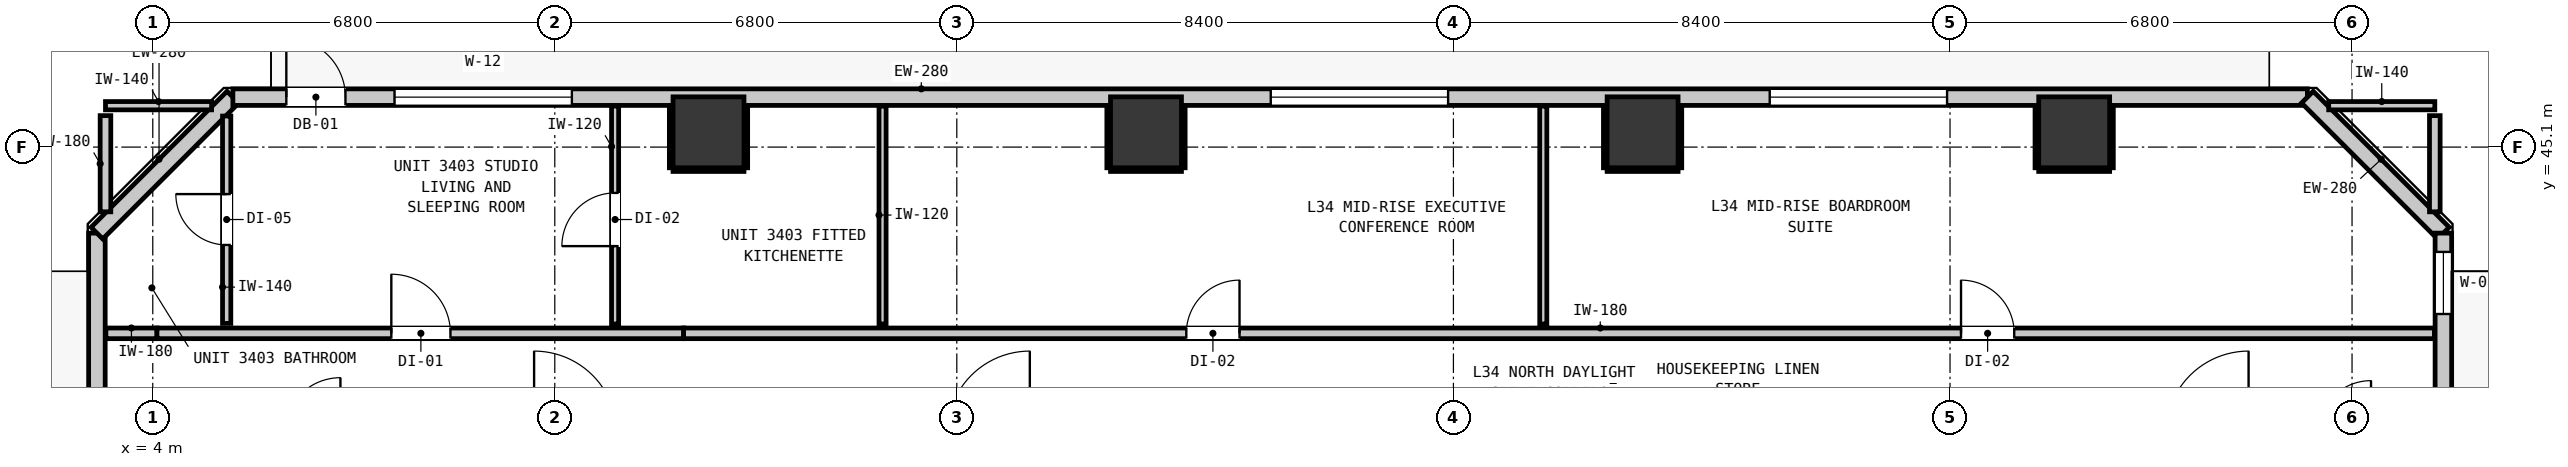
"""IFC4 building model, lengths in metres.
Left out: names, types, materials, properties, quantities, classifications, styles, units other than length and angle.
Written with IfcOpenShell. Run it as: python <this file> out.ifc"""

import sys

from ifc_helpers import new_model, si_unit, direction, frame, frame_2d, origin, origin_2d, place, context, subcontext, project, spatial, rectangle, extrude, element, fill, save


model = new_model("IFC4")
c1 = context("Model", 3, precision=1e-05, world=origin(), true_north=direction((0.0, 1.0)))
c2 = subcontext(c1, "Body", "Model", "MODEL_VIEW")
j1 = project(units=[si_unit("LENGTHUNIT", "METRE"), si_unit("PLANEANGLEUNIT", "RADIAN")], contexts=[c1])
p1 = place(None, origin())
s1 = spatial("IfcSite", under=j1, at=p1, CompositionType="ELEMENT")
p2 = place(p1, origin())
s2 = spatial("IfcBuilding", under=s1, at=p2, CompositionType="ELEMENT")
p3 = place(p2, frame((0.0, 0.0, 119.36)))
s3 = spatial("IfcBuildingStorey", under=s2, at=p3, CompositionType="ELEMENT", Elevation=119.36)
for number, where, z_axis, x_axis in (
    (1, (13.4, 45.35, 0.0), (0.0, 0.0, 1.0), (1.0, 0.0, 0.0)),
    (2, (20.8, 45.35, 0.0), (0.0, 0.0, 1.0), (1.0, 0.0, 0.0)),
    (3, (29.2, 45.35, 0.0), (0.0, 0.0, 1.0), (1.0, 0.0, 0.0)),
    (4, (36.5, 45.35, 0.0), (0.0, 0.0, 1.0), (1.0, 0.0, 0.0)),
):
    element("IfcColumn", number, at=place(p3, frame(where, z_axis=z_axis, x_axis=x_axis)), inside=s3, PredefinedType="COLUMN", context=c2, shape_type="SweptSolid", body=[
        extrude(rectangle(XDim=1.2, YDim=1.2, at=origin_2d()), origin(), (0.0, 0.0, 1.0), 3.32),
    ])
p4 = place(p3, frame((3.055, 11.355, 0.0), z_axis=(0.0, 0.0, 1.0), x_axis=(0.0, 1.0, 0.0)))
e5 = element("IfcWall", 5, at=p4, inside=s3, PredefinedType="STANDARD", context=c2, shape_type="SweptSolid", body=[
    extrude(rectangle(XDim=32.29, YDim=0.28, at=frame_2d((16.145, 0.0))), origin(), (0.0, 0.0, 1.0), 3.08),
])
p5 = place(p4, frame((5.818, 0.0, 0.0)))
e6 = element("IfcOpeningElement", 6, at=p5, cuts=e5, PredefinedType="OPENING", context=c2, shape_type="SweptSolid", body=[
    extrude(rectangle(XDim=1.0, YDim=2.15, at=frame_2d((0.5, 1.075))), frame((0.0, 0.15, 0.0), z_axis=(0.0, -1.0, 0.0), x_axis=(1.0, 0.0, 0.0)), (0.0, 0.0, 1.0), 0.3),
])
p6 = place(p4, frame((0.545, 0.0, 0.85)))
e7 = element("IfcOpeningElement", 7, at=p6, cuts=e5, PredefinedType="OPENING", context=c2, shape_type="SweptSolid", body=[
    extrude(rectangle(XDim=1.05, YDim=1.65, at=frame_2d((0.525, 0.825))), frame((0.0, 0.15, 0.0), z_axis=(0.0, -1.0, 0.0), x_axis=(1.0, 0.0, 0.0)), (0.0, 0.0, 1.0), 0.3),
])
p7 = place(p4, frame((13.495, 0.0, 0.85)))
e8 = element("IfcOpeningElement", 8, at=p7, cuts=e5, PredefinedType="OPENING", context=c2, shape_type="SweptSolid", body=[
    extrude(rectangle(XDim=3.0, YDim=2.1, at=frame_2d((1.5, 1.05))), frame((0.0, 0.15, 0.0), z_axis=(0.0, -1.0, 0.0), x_axis=(1.0, 0.0, 0.0)), (0.0, 0.0, 1.0), 0.3),
])
p8 = place(p3, frame((3.055, 43.645, 0.0), z_axis=(0.0, 0.0, 1.0), x_axis=(0.707106781187, 0.707106781187, 0.0)))
e9 = element("IfcWall", 9, at=p8, inside=s3, PredefinedType="STANDARD", context=c2, shape_type="SweptSolid", body=[
    extrude(rectangle(XDim=3.253, YDim=0.28, at=frame_2d((1.626, 0.0))), origin(), (0.0, 0.0, 1.0), 3.08),
])
p9 = place(p3, frame((5.355, 45.945, 0.0), z_axis=(0.0, 0.0, 1.0), x_axis=(1.0, 0.0, 0.0)))
e10 = element("IfcWall", 10, at=p9, inside=s3, PredefinedType="STANDARD", context=c2, shape_type="SweptSolid", body=[
    extrude(rectangle(XDim=35.09, YDim=0.28, at=frame_2d((17.545, 0.0))), origin(), (0.0, 0.0, 1.0), 3.08),
])
p10 = place(p9, frame((0.904, 0.0, 0.0)))
e11 = element("IfcOpeningElement", 11, at=p10, cuts=e10, PredefinedType="OPENING", context=c2, shape_type="SweptSolid", body=[
    extrude(rectangle(XDim=1.0, YDim=2.15, at=frame_2d((0.5, 1.075))), frame((0.0, 0.15, 0.0), z_axis=(0.0, -1.0, 0.0), x_axis=(1.0, 0.0, 0.0)), (0.0, 0.0, 1.0), 0.3),
])
p11 = place(p9, frame((2.734, 0.0, 0.85)))
e12 = element("IfcOpeningElement", 12, at=p11, cuts=e10, PredefinedType="OPENING", context=c2, shape_type="SweptSolid", body=[
    extrude(rectangle(XDim=3.0, YDim=2.1, at=frame_2d((1.5, 1.05))), frame((0.0, 0.15, 0.0), z_axis=(0.0, -1.0, 0.0), x_axis=(1.0, 0.0, 0.0)), (0.0, 0.0, 1.0), 0.3),
])
p12 = place(p9, frame((17.555, 0.0, 0.85)))
e13 = element("IfcOpeningElement", 13, at=p12, cuts=e10, PredefinedType="OPENING", context=c2, shape_type="SweptSolid", body=[
    extrude(rectangle(XDim=3.0, YDim=2.1, at=frame_2d((1.5, 1.05))), frame((0.0, 0.15, 0.0), z_axis=(0.0, -1.0, 0.0), x_axis=(1.0, 0.0, 0.0)), (0.0, 0.0, 1.0), 0.3),
])
p13 = place(p9, frame((25.995, 0.0, 0.85)))
e14 = element("IfcOpeningElement", 14, at=p13, cuts=e10, PredefinedType="OPENING", context=c2, shape_type="SweptSolid", body=[
    extrude(rectangle(XDim=3.0, YDim=2.1, at=frame_2d((1.5, 1.05))), frame((0.0, 0.15, 0.0), z_axis=(0.0, -1.0, 0.0), x_axis=(1.0, 0.0, 0.0)), (0.0, 0.0, 1.0), 0.3),
])
p14 = place(p3, frame((40.445, 45.945, 0.0), z_axis=(0.0, 0.0, 1.0), x_axis=(0.707106781187, -0.707106781187, 0.0)))
e15 = element("IfcWall", 15, at=p14, inside=s3, PredefinedType="STANDARD", context=c2, shape_type="SweptSolid", body=[
    extrude(rectangle(XDim=3.253, YDim=0.28, at=frame_2d((1.626, 0.0))), origin(), (0.0, 0.0, 1.0), 3.08),
])
p15 = place(p3, frame((42.745, 43.645, 0.0), z_axis=(0.0, 0.0, 1.0), x_axis=(0.0, -1.0, 0.0)))
e16 = element("IfcWall", 16, at=p15, inside=s3, PredefinedType="STANDARD", context=c2, shape_type="SweptSolid", body=[
    extrude(rectangle(XDim=32.29, YDim=0.28, at=frame_2d((16.145, 0.0))), origin(), (0.0, 0.0, 1.0), 3.08),
])
p16 = place(p15, frame((5.467, 0.0, 0.0)))
e17 = element("IfcOpeningElement", 17, at=p16, cuts=e16, PredefinedType="OPENING", context=c2, shape_type="SweptSolid", body=[
    extrude(rectangle(XDim=1.0, YDim=2.15, at=frame_2d((0.5, 1.075))), frame((0.0, 0.15, 0.0), z_axis=(0.0, -1.0, 0.0), x_axis=(1.0, 0.0, 0.0)), (0.0, 0.0, 1.0), 0.3),
])
p17 = place(p15, frame((28.098, 0.0, 0.85)))
e18 = element("IfcOpeningElement", 18, at=p17, cuts=e16, PredefinedType="OPENING", context=c2, shape_type="SweptSolid", body=[
    extrude(rectangle(XDim=3.0, YDim=2.1, at=frame_2d((1.5, 1.05))), frame((0.0, 0.15, 0.0), z_axis=(0.0, -1.0, 0.0), x_axis=(1.0, 0.0, 0.0)), (0.0, 0.0, 1.0), 0.3),
])
p18 = place(p15, frame((0.318, 0.0, 0.85)))
e19 = element("IfcOpeningElement", 19, at=p18, cuts=e16, PredefinedType="OPENING", context=c2, shape_type="SweptSolid", body=[
    extrude(rectangle(XDim=1.05, YDim=1.65, at=frame_2d((0.525, 0.825))), frame((0.0, 0.15, 0.0), z_axis=(0.0, -1.0, 0.0), x_axis=(1.0, 0.0, 0.0)), (0.0, 0.0, 1.0), 0.3),
])
p19 = place(p15, frame((14.883, 0.0, 0.85)))
e20 = element("IfcOpeningElement", 20, at=p19, cuts=e16, PredefinedType="OPENING", context=c2, shape_type="SweptSolid", body=[
    extrude(rectangle(XDim=3.0, YDim=2.1, at=frame_2d((1.5, 1.05))), frame((0.0, 0.15, 0.0), z_axis=(0.0, -1.0, 0.0), x_axis=(1.0, 0.0, 0.0)), (0.0, 0.0, 1.0), 0.3),
])
p20 = place(p3, frame((3.207, 41.95, 0.0), z_axis=(0.0, 0.0, 1.0), x_axis=(1.0, 0.0, 0.0)))
e21 = element("IfcWall", 21, at=p20, inside=s3, PredefinedType="PARTITIONING", context=c2, shape_type="SweptSolid", body=[
    extrude(rectangle(XDim=0.864, YDim=0.18, at=frame_2d((0.432, 0.0))), origin(), (0.0, 0.0, 1.0), 3.08),
])
p21 = place(p3, frame((4.071, 41.95, 0.0), z_axis=(0.0, 0.0, 1.0), x_axis=(1.0, 0.0, 0.0)))
e22 = element("IfcWall", 22, at=p21, inside=s3, PredefinedType="PARTITIONING", context=c2, shape_type="SweptSolid", body=[
    extrude(rectangle(XDim=8.908, YDim=0.18, at=frame_2d((4.454, 0.0))), origin(), (0.0, 0.0, 1.0), 2.565),
])
p22 = place(p21, frame((3.964, 0.0, 0.0)))
e23 = element("IfcOpeningElement", 23, at=p22, cuts=e22, PredefinedType="OPENING", context=c2, shape_type="SweptSolid", body=[
    extrude(rectangle(XDim=1.0, YDim=2.15, at=frame_2d((0.5, 1.075))), frame((0.0, 0.1, 0.0), z_axis=(0.0, -1.0, 0.0), x_axis=(1.0, 0.0, 0.0)), (0.0, 0.0, 1.0), 0.2),
])
p23 = place(p3, frame((12.979, 41.95, 0.0), z_axis=(0.0, 0.0, 1.0), x_axis=(1.0, 0.0, 0.0)))
e24 = element("IfcWall", 24, at=p23, inside=s3, PredefinedType="PARTITIONING", context=c2, shape_type="SweptSolid", body=[
    extrude(rectangle(XDim=29.614, YDim=0.18, at=frame_2d((14.807, 0.0))), origin(), (0.0, 0.0, 1.0), 3.08),
])
p24 = place(p23, frame((8.503, 0.0, 0.0)))
e25 = element("IfcOpeningElement", 25, at=p24, cuts=e24, PredefinedType="OPENING", context=c2, shape_type="SweptSolid", body=[
    extrude(rectangle(XDim=0.9, YDim=2.1, at=frame_2d((0.45, 1.05))), frame((0.0, 0.1, 0.0), z_axis=(0.0, -1.0, 0.0), x_axis=(1.0, 0.0, 0.0)), (0.0, 0.0, 1.0), 0.2),
])
p25 = place(p23, frame((21.607, 0.0, 0.0)))
e26 = element("IfcOpeningElement", 26, at=p25, cuts=e24, PredefinedType="OPENING", context=c2, shape_type="SweptSolid", body=[
    extrude(rectangle(XDim=0.9, YDim=2.1, at=frame_2d((0.45, 1.05))), frame((0.0, 0.1, 0.0), z_axis=(0.0, -1.0, 0.0), x_axis=(1.0, 0.0, 0.0)), (0.0, 0.0, 1.0), 0.2),
])
for number, where, z_axis, x_axis in (
    (27, (3.2, 45.8, 0.0), (0.0, 0.0, 1.0), (1.0, 0.0, 0.0)),
    (28, (40.805, 45.8, 0.0), (0.0, 0.0, 1.0), (1.0, 0.0, 0.0)),
):
    element("IfcWall", number, at=place(p3, frame(where, z_axis=z_axis, x_axis=x_axis)), inside=s3, PredefinedType="PARTITIONING", context=c2, shape_type="SweptSolid", body=[
        extrude(rectangle(XDim=1.795, YDim=0.14, at=frame_2d((0.897, 0.0))), origin(), (0.0, 0.0, 1.0), 3.08),
    ])
for number, where, z_axis, x_axis in (
    (29, (3.2, 44.005, 0.0), (0.0, 0.0, 1.0), (0.0, 1.0, 0.0)),
    (30, (42.6, 44.005, 0.0), (0.0, 0.0, 1.0), (0.0, 1.0, 0.0)),
):
    element("IfcWall", number, at=place(p3, frame(where, z_axis=z_axis, x_axis=x_axis)), inside=s3, PredefinedType="PARTITIONING", context=c2, shape_type="SweptSolid", body=[
        extrude(rectangle(XDim=1.627, YDim=0.18, at=frame_2d((0.813, 0.0))), origin(), (0.0, 0.0, 1.0), 3.08),
    ])
p26 = place(p3, frame((5.25, 42.118, 0.0), z_axis=(0.0, 0.0, 1.0), x_axis=(0.0, 1.0, 0.0)))
e31 = element("IfcWall", 31, at=p26, inside=s3, PredefinedType="PARTITIONING", context=c2, shape_type="SweptSolid", body=[
    extrude(rectangle(XDim=3.507, YDim=0.14, at=frame_2d((1.753, 0.0))), origin(), (0.0, 0.0, 1.0), 3.08),
])
p27 = place(p26, frame((1.327, 0.0, 0.0)))
e32 = element("IfcOpeningElement", 32, at=p27, cuts=e31, PredefinedType="OPENING", context=c2, shape_type="SweptSolid", body=[
    extrude(rectangle(XDim=0.86, YDim=2.02, at=frame_2d((0.43, 1.01))), frame((0.0, 0.08, 0.0), z_axis=(0.0, -1.0, 0.0), x_axis=(1.0, 0.0, 0.0)), (0.0, 0.0, 1.0), 0.16),
])
p28 = place(p3, frame((11.82, 42.108, 0.0), z_axis=(0.0, 0.0, 1.0), x_axis=(0.0, 1.0, 0.0)))
e33 = element("IfcWall", 33, at=p28, inside=s3, PredefinedType="PARTITIONING", context=c2, shape_type="SweptSolid", body=[
    extrude(rectangle(XDim=3.685, YDim=0.12, at=frame_2d((1.843, 0.0))), origin(), (0.0, 0.0, 1.0), 3.08),
])
p29 = place(p28, frame((1.317, 0.0, 0.0)))
e34 = element("IfcOpeningElement", 34, at=p29, cuts=e33, PredefinedType="OPENING", context=c2, shape_type="SweptSolid", body=[
    extrude(rectangle(XDim=0.9, YDim=2.1, at=frame_2d((0.45, 1.05))), frame((0.0, 0.07, 0.0), z_axis=(0.0, -1.0, 0.0), x_axis=(1.0, 0.0, 0.0)), (0.0, 0.0, 1.0), 0.14),
])
for number, where, z_axis, x_axis in (
    (35, (16.344, 42.108, 0.0), (0.0, 0.0, 1.0), (0.0, 1.0, 0.0)),
    (36, (27.52, 42.108, 0.0), (0.0, 0.0, 1.0), (0.0, 1.0, 0.0)),
):
    element("IfcWall", number, at=place(p3, frame(where, z_axis=z_axis, x_axis=x_axis)), inside=s3, PredefinedType="PARTITIONING", context=c2, shape_type="SweptSolid", body=[
        extrude(rectangle(XDim=3.685, YDim=0.12, at=frame_2d((1.843, 0.0))), origin(), (0.0, 0.0, 1.0), 3.08),
    ])
p30 = place(p3, frame((12.8, 44.718, 0.0), z_axis=(0.0, 0.0, 1.0), x_axis=(1.0, 0.0, 0.0)))
e37 = element("IfcWall", 37, at=p30, inside=s3, PredefinedType="PARTITIONING", context=c2, shape_type="SweptSolid", body=[
    extrude(rectangle(XDim=1.2, YDim=0.06, at=frame_2d((0.6, 0.0))), origin(), (0.0, 0.0, 1.0), 1.45),
])
for number, where, z_axis, x_axis in (
    (38, (12.768, 44.75, 0.0), (0.0, 0.0, 1.0), (0.0, 1.0, 0.0)),
    (39, (14.032, 44.75, 0.0), (0.0, 0.0, 1.0), (0.0, 1.0, 0.0)),
):
    element("IfcWall", number, at=place(p3, frame(where, z_axis=z_axis, x_axis=x_axis)), inside=s3, PredefinedType="PARTITIONING", context=c2, shape_type="SweptSolid", body=[
        extrude(rectangle(XDim=1.04, YDim=0.06, at=frame_2d((0.52, 0.0))), origin(), (0.0, 0.0, 1.0), 1.45),
    ])
p31 = place(p3, frame((20.2, 44.718, 0.0), z_axis=(0.0, 0.0, 1.0), x_axis=(1.0, 0.0, 0.0)))
e40 = element("IfcWall", 40, at=p31, inside=s3, PredefinedType="PARTITIONING", context=c2, shape_type="SweptSolid", body=[
    extrude(rectangle(XDim=1.2, YDim=0.06, at=frame_2d((0.6, 0.0))), origin(), (0.0, 0.0, 1.0), 1.45),
])
for number, where, z_axis, x_axis in (
    (41, (20.168, 44.75, 0.0), (0.0, 0.0, 1.0), (0.0, 1.0, 0.0)),
    (42, (21.432, 44.75, 0.0), (0.0, 0.0, 1.0), (0.0, 1.0, 0.0)),
):
    element("IfcWall", number, at=place(p3, frame(where, z_axis=z_axis, x_axis=x_axis)), inside=s3, PredefinedType="PARTITIONING", context=c2, shape_type="SweptSolid", body=[
        extrude(rectangle(XDim=1.04, YDim=0.06, at=frame_2d((0.52, 0.0))), origin(), (0.0, 0.0, 1.0), 1.45),
    ])
p32 = place(p3, frame((28.6, 44.718, 0.0), z_axis=(0.0, 0.0, 1.0), x_axis=(1.0, 0.0, 0.0)))
e43 = element("IfcWall", 43, at=p32, inside=s3, PredefinedType="PARTITIONING", context=c2, shape_type="SweptSolid", body=[
    extrude(rectangle(XDim=1.2, YDim=0.06, at=frame_2d((0.6, 0.0))), origin(), (0.0, 0.0, 1.0), 1.45),
])
for number, where, z_axis, x_axis in (
    (44, (28.568, 44.75, 0.0), (0.0, 0.0, 1.0), (0.0, 1.0, 0.0)),
    (45, (29.832, 44.75, 0.0), (0.0, 0.0, 1.0), (0.0, 1.0, 0.0)),
):
    element("IfcWall", number, at=place(p3, frame(where, z_axis=z_axis, x_axis=x_axis)), inside=s3, PredefinedType="PARTITIONING", context=c2, shape_type="SweptSolid", body=[
        extrude(rectangle(XDim=1.04, YDim=0.06, at=frame_2d((0.52, 0.0))), origin(), (0.0, 0.0, 1.0), 1.45),
    ])
p33 = place(p3, frame((35.9, 44.718, 0.0), z_axis=(0.0, 0.0, 1.0), x_axis=(1.0, 0.0, 0.0)))
e46 = element("IfcWall", 46, at=p33, inside=s3, PredefinedType="PARTITIONING", context=c2, shape_type="SweptSolid", body=[
    extrude(rectangle(XDim=1.2, YDim=0.06, at=frame_2d((0.6, 0.0))), origin(), (0.0, 0.0, 1.0), 1.45),
])
for number, where, z_axis, x_axis in (
    (47, (35.868, 44.75, 0.0), (0.0, 0.0, 1.0), (0.0, 1.0, 0.0)),
    (48, (37.132, 44.75, 0.0), (0.0, 0.0, 1.0), (0.0, 1.0, 0.0)),
):
    element("IfcWall", number, at=place(p3, frame(where, z_axis=z_axis, x_axis=x_axis)), inside=s3, PredefinedType="PARTITIONING", context=c2, shape_type="SweptSolid", body=[
        extrude(rectangle(XDim=1.04, YDim=0.06, at=frame_2d((0.52, 0.0))), origin(), (0.0, 0.0, 1.0), 1.45),
    ])
p34 = place(p10, origin())
e49 = element("IfcDoor", 49, at=p34, inside=s3, OperationType="SINGLE_SWING_LEFT", PredefinedType="DOOR", context=c2, shape_type="SweptSolid", body=[
    extrude(rectangle(XDim=1.0, YDim=2.15, at=frame_2d((0.5, 1.075))), frame((0.0, 0.025, 0.0), z_axis=(0.0, -1.0, 0.0), x_axis=(1.0, 0.0, 0.0)), (0.0, 0.0, 1.0), 0.05),
])
fill(e11, e49)
p35 = place(p11, origin())
e50 = element("IfcWindow", 50, at=p35, inside=s3, PartitioningType="SINGLE_PANEL", PredefinedType="WINDOW", context=c2, shape_type="SweptSolid", body=[
    extrude(rectangle(XDim=3.0, YDim=2.1, at=frame_2d((1.5, 1.05))), frame((0.0, 0.03, 0.0), z_axis=(0.0, -1.0, 0.0), x_axis=(1.0, 0.0, 0.0)), (0.0, 0.0, 1.0), 0.06),
])
fill(e12, e50)
p36 = place(p12, origin())
e51 = element("IfcWindow", 51, at=p36, inside=s3, PartitioningType="SINGLE_PANEL", PredefinedType="WINDOW", context=c2, shape_type="SweptSolid", body=[
    extrude(rectangle(XDim=3.0, YDim=2.1, at=frame_2d((1.5, 1.05))), frame((0.0, 0.03, 0.0), z_axis=(0.0, -1.0, 0.0), x_axis=(1.0, 0.0, 0.0)), (0.0, 0.0, 1.0), 0.06),
])
fill(e13, e51)
p37 = place(p13, origin())
e52 = element("IfcWindow", 52, at=p37, inside=s3, PartitioningType="SINGLE_PANEL", PredefinedType="WINDOW", context=c2, shape_type="SweptSolid", body=[
    extrude(rectangle(XDim=3.0, YDim=2.1, at=frame_2d((1.5, 1.05))), frame((0.0, 0.03, 0.0), z_axis=(0.0, -1.0, 0.0), x_axis=(1.0, 0.0, 0.0)), (0.0, 0.0, 1.0), 0.06),
])
fill(e14, e52)
p38 = place(p18, origin())
e53 = element("IfcWindow", 53, at=p38, inside=s3, PartitioningType="SINGLE_PANEL", PredefinedType="WINDOW", context=c2, shape_type="SweptSolid", body=[
    extrude(rectangle(XDim=1.05, YDim=1.65, at=frame_2d((0.525, 0.825))), frame((0.0, 0.03, 0.0), z_axis=(0.0, -1.0, 0.0), x_axis=(1.0, 0.0, 0.0)), (0.0, 0.0, 1.0), 0.06),
])
fill(e19, e53)
p39 = place(p22, origin())
e54 = element("IfcDoor", 54, at=p39, inside=s3, OperationType="SINGLE_SWING_LEFT", PredefinedType="DOOR", context=c2, shape_type="SweptSolid", body=[
    extrude(rectangle(XDim=1.0, YDim=2.15, at=frame_2d((0.5, 1.075))), frame((0.0, 0.025, 0.0), z_axis=(0.0, -1.0, 0.0), x_axis=(1.0, 0.0, 0.0)), (0.0, 0.0, 1.0), 0.05),
])
fill(e23, e54)
p40 = place(p27, origin())
e55 = element("IfcDoor", 55, at=p40, inside=s3, OperationType="SINGLE_SWING_RIGHT", PredefinedType="DOOR", context=c2, shape_type="SweptSolid", body=[
    extrude(rectangle(XDim=0.86, YDim=2.02, at=frame_2d((0.43, 1.01))), frame((0.0, 0.025, 0.0), z_axis=(0.0, -1.0, 0.0), x_axis=(1.0, 0.0, 0.0)), (0.0, 0.0, 1.0), 0.05),
])
fill(e32, e55)
p41 = place(p29, origin())
e56 = element("IfcDoor", 56, at=p41, inside=s3, OperationType="SINGLE_SWING_LEFT", PredefinedType="DOOR", context=c2, shape_type="SweptSolid", body=[
    extrude(rectangle(XDim=0.9, YDim=2.1, at=frame_2d((0.45, 1.05))), frame((0.0, 0.025, 0.0), z_axis=(0.0, -1.0, 0.0), x_axis=(1.0, 0.0, 0.0)), (0.0, 0.0, 1.0), 0.05),
])
fill(e34, e56)
p42 = place(p24, origin())
e57 = element("IfcDoor", 57, at=p42, inside=s3, OperationType="SINGLE_SWING_RIGHT", PredefinedType="DOOR", context=c2, shape_type="SweptSolid", body=[
    extrude(rectangle(XDim=0.9, YDim=2.1, at=frame_2d((0.45, 1.05))), frame((0.0, 0.025, 0.0), z_axis=(0.0, -1.0, 0.0), x_axis=(1.0, 0.0, 0.0)), (0.0, 0.0, 1.0), 0.05),
])
fill(e25, e57)
p43 = place(p25, origin())
e58 = element("IfcDoor", 58, at=p43, inside=s3, OperationType="SINGLE_SWING_LEFT", PredefinedType="DOOR", context=c2, shape_type="SweptSolid", body=[
    extrude(rectangle(XDim=0.9, YDim=2.1, at=frame_2d((0.45, 1.05))), frame((0.0, 0.025, 0.0), z_axis=(0.0, -1.0, 0.0), x_axis=(1.0, 0.0, 0.0)), (0.0, 0.0, 1.0), 0.05),
])
fill(e26, e58)
save(model, sys.argv[1])
